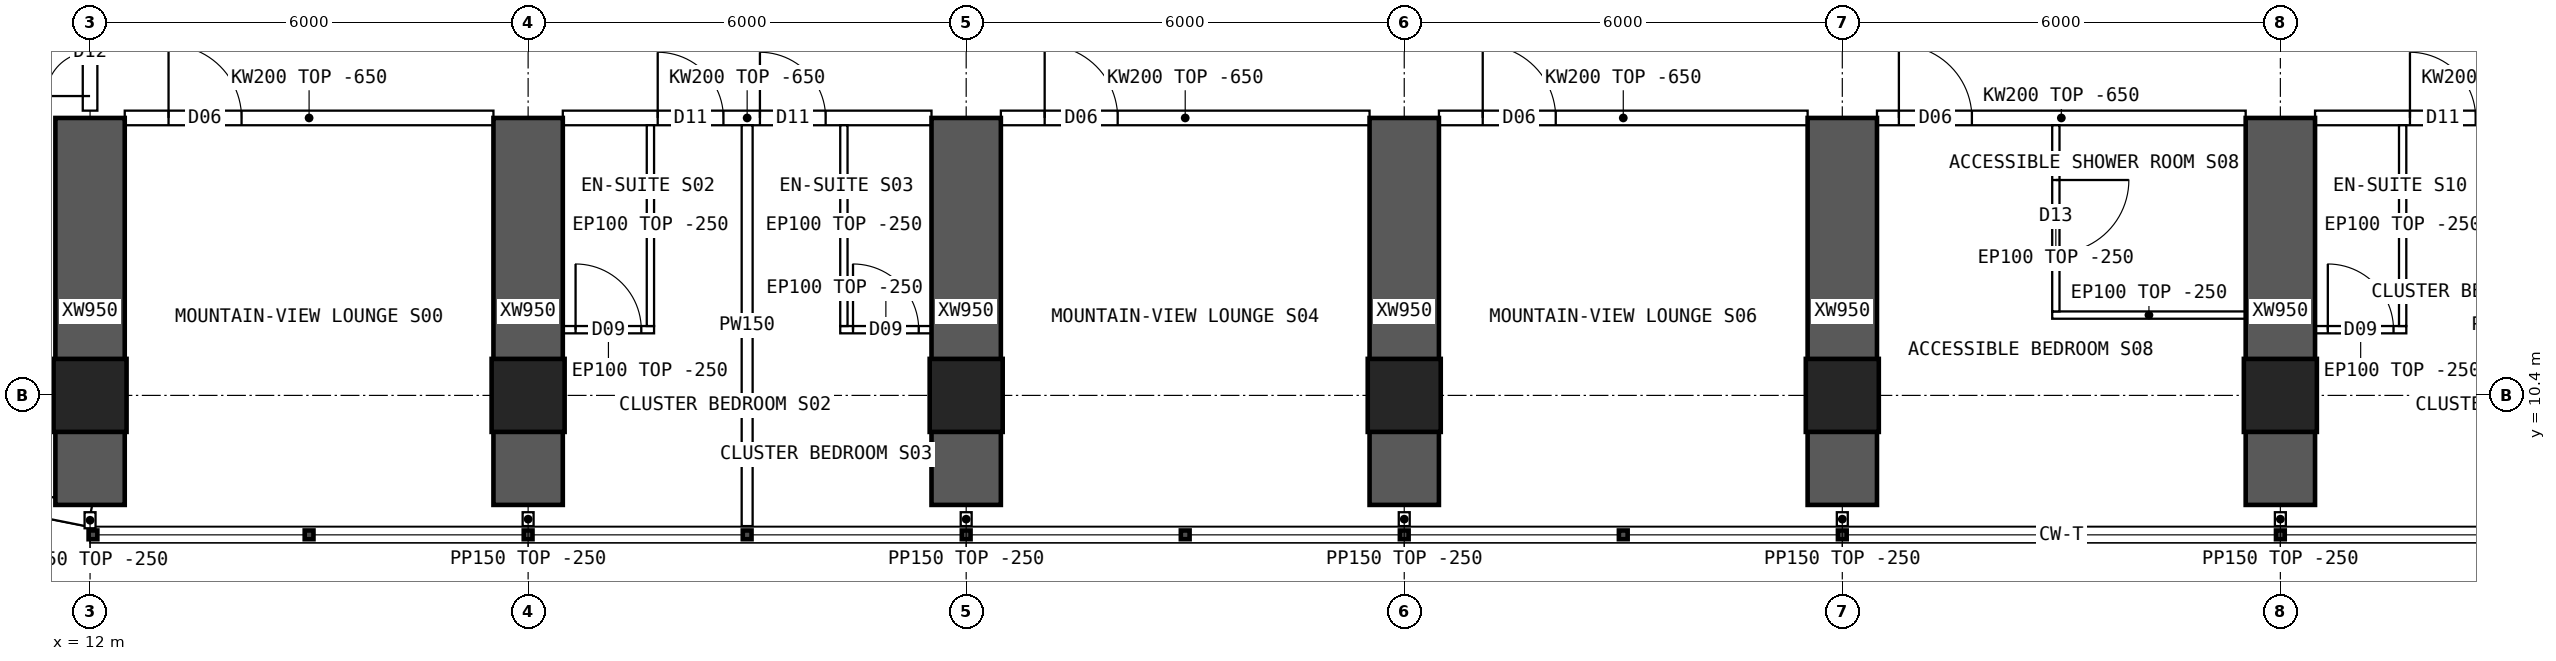
"""IFC4 building model, lengths in metres.
Left out: names, types, materials, properties, quantities, classifications, styles, units other than length and angle.
Written with IfcOpenShell. Run it as: python <this file> out.ifc"""

import sys

from ifc_helpers import new_model, si_unit, direction, frame, frame_2d, origin, origin_2d, place, context, subcontext, project, spatial, polyline, rectangle, hollow_rectangle, outline, extrude, element, fill, save


model = new_model("IFC4")
c1 = context("Model", 3, precision=1e-05, world=origin(), true_north=direction((0.0, 1.0)))
c2 = subcontext(c1, "Body", "Model", "MODEL_VIEW")
j1 = project(units=[si_unit("LENGTHUNIT", "METRE"), si_unit("PLANEANGLEUNIT", "RADIAN")], contexts=[c1])
p1 = place(None, origin())
s1 = spatial("IfcSite", under=j1, at=p1, CompositionType="ELEMENT")
p2 = place(p1, origin())
s2 = spatial("IfcBuilding", under=s1, at=p2, CompositionType="ELEMENT")
p3 = place(p2, frame((0.0, 0.0, 103.15)))
s3 = spatial("IfcBuildingStorey", under=s2, at=p3, CompositionType="ELEMENT", Elevation=103.15)
for number, where, z_axis, x_axis in (
    (1, (12.0, 10.4, 0.0), (0.0, 0.0, 1.0), (1.0, 0.0, 0.0)),
    (2, (18.0, 10.4, 0.0), (0.0, 0.0, 1.0), (1.0, 0.0, 0.0)),
    (3, (24.0, 10.4, 0.0), (0.0, 0.0, 1.0), (1.0, 0.0, 0.0)),
    (4, (30.0, 10.4, 0.0), (0.0, 0.0, 1.0), (1.0, 0.0, 0.0)),
    (5, (36.0, 10.4, 0.0), (0.0, 0.0, 1.0), (1.0, 0.0, 0.0)),
    (6, (42.0, 10.4, 0.0), (0.0, 0.0, 1.0), (1.0, 0.0, 0.0)),
):
    element("IfcColumn", number, at=place(p3, frame(where, z_axis=z_axis, x_axis=x_axis)), inside=s3, PredefinedType="COLUMN", context=c2, shape_type="SweptSolid", body=[
        extrude(hollow_rectangle(XDim=1.0, YDim=1.0, WallThickness=0.1, at=origin_2d()), origin(), (0.0, 0.0, 1.0), 3.75),
    ])
for number, where, z_axis, x_axis in (
    (7, (12.0, 8.9, 0.0), (0.0, 0.0, 1.0), (0.0, 1.0, 0.0)),
    (8, (18.0, 8.9, 0.0), (0.0, 0.0, 1.0), (0.0, 1.0, 0.0)),
    (9, (24.0, 8.9, 0.0), (0.0, 0.0, 1.0), (0.0, 1.0, 0.0)),
    (10, (30.0, 8.9, 0.0), (0.0, 0.0, 1.0), (0.0, 1.0, 0.0)),
    (11, (36.0, 8.9, 0.0), (0.0, 0.0, 1.0), (0.0, 1.0, 0.0)),
    (12, (42.0, 8.9, 0.0), (0.0, 0.0, 1.0), (0.0, 1.0, 0.0)),
):
    element("IfcWall", number, at=place(p3, frame(where, z_axis=z_axis, x_axis=x_axis)), inside=s3, PredefinedType="SHEAR", context=c2, shape_type="SweptSolid", body=[
        extrude(rectangle(XDim=5.3, YDim=0.95, at=frame_2d((2.65, 0.0))), origin(), (0.0, 0.0, 1.0), 3.75),
    ])
p4 = place(p3, frame((8.843, 9.378, 0.0), z_axis=(0.0, 0.0, 1.0), x_axis=(0.980787251524, -0.195080412259, 0.0)))
e13 = element("IfcWall", 13, at=p4, inside=s3, PredefinedType="SOLIDWALL", context=c2, shape_type="SweptSolid", body=[
    extrude(outline(polyline([(-0.03, -0.15), (3.249, -0.15), (3.189, 0.15), (0.03, 0.15), (-0.03, -0.15)])), origin(), (0.0, 0.0, 1.0), 3.5),
])
p5 = place(p4, frame((0.909, 0.0, 0.9)))
e14 = element("IfcOpeningElement", 14, at=p5, cuts=e13, PredefinedType="OPENING", context=c2, shape_type="SweptSolid", body=[
    extrude(rectangle(XDim=1.4, YDim=1.8, at=frame_2d((0.7, 0.9))), frame((0.0, 0.16, 0.0), z_axis=(0.0, -1.0, 0.0), x_axis=(1.0, 0.0, 0.0)), (0.0, 0.0, 1.0), 0.32),
])
p6 = place(p3, frame((12.475, 14.2, 0.0), z_axis=(0.0, 0.0, 1.0), x_axis=(1.0, 0.0, 0.0)))
e15 = element("IfcWall", 15, at=p6, inside=s3, PredefinedType="SOLIDWALL", context=c2, shape_type="SweptSolid", body=[
    extrude(outline(polyline([(0.0, 0.0), (5.05, 0.0), (5.05, 3.1), (0.0, 3.1), (0.0, 0.0)])), frame((0.0, 0.1, 0.0), z_axis=(0.0, -1.0, 0.0), x_axis=(1.0, 0.0, 0.0)), (0.0, 0.0, 1.0), 0.2),
])
p7 = place(p6, frame((0.6, 0.0, 0.0)))
e16 = element("IfcOpeningElement", 16, at=p7, cuts=e15, PredefinedType="OPENING", context=c2, shape_type="SweptSolid", body=[
    extrude(rectangle(XDim=1.0, YDim=2.1, at=frame_2d((0.5, 1.05))), frame((0.0, 0.11, 0.0), z_axis=(0.0, -1.0, 0.0), x_axis=(1.0, 0.0, 0.0)), (0.0, 0.0, 1.0), 0.22),
])
p8 = place(p3, frame((18.475, 14.2, 0.0), z_axis=(0.0, 0.0, 1.0), x_axis=(1.0, 0.0, 0.0)))
e17 = element("IfcWall", 17, at=p8, inside=s3, PredefinedType="SOLIDWALL", context=c2, shape_type="SweptSolid", body=[
    extrude(outline(polyline([(0.0, 0.0), (5.05, 0.0), (5.05, 3.1), (0.0, 3.1), (0.0, 0.0)])), frame((0.0, 0.1, 0.0), z_axis=(0.0, -1.0, 0.0), x_axis=(1.0, 0.0, 0.0)), (0.0, 0.0, 1.0), 0.2),
])
p9 = place(p8, frame((1.3, 0.0, 0.0)))
e18 = element("IfcOpeningElement", 18, at=p9, cuts=e17, PredefinedType="OPENING", context=c2, shape_type="SweptSolid", body=[
    extrude(rectangle(XDim=0.9, YDim=2.1, at=frame_2d((0.45, 1.05))), frame((0.0, 0.11, 0.0), z_axis=(0.0, -1.0, 0.0), x_axis=(1.0, 0.0, 0.0)), (0.0, 0.0, 1.0), 0.22),
])
p10 = place(p8, frame((2.7, 0.0, 0.0)))
e19 = element("IfcOpeningElement", 19, at=p10, cuts=e17, PredefinedType="OPENING", context=c2, shape_type="SweptSolid", body=[
    extrude(rectangle(XDim=0.9, YDim=2.1, at=frame_2d((0.45, 1.05))), frame((0.0, 0.11, 0.0), z_axis=(0.0, -1.0, 0.0), x_axis=(1.0, 0.0, 0.0)), (0.0, 0.0, 1.0), 0.22),
])
p11 = place(p3, frame((24.475, 14.2, 0.0), z_axis=(0.0, 0.0, 1.0), x_axis=(1.0, 0.0, 0.0)))
e20 = element("IfcWall", 20, at=p11, inside=s3, PredefinedType="SOLIDWALL", context=c2, shape_type="SweptSolid", body=[
    extrude(outline(polyline([(0.0, 0.0), (5.05, 0.0), (5.05, 3.1), (0.0, 3.1), (0.0, 0.0)])), frame((0.0, 0.1, 0.0), z_axis=(0.0, -1.0, 0.0), x_axis=(1.0, 0.0, 0.0)), (0.0, 0.0, 1.0), 0.2),
])
p12 = place(p11, frame((0.6, 0.0, 0.0)))
e21 = element("IfcOpeningElement", 21, at=p12, cuts=e20, PredefinedType="OPENING", context=c2, shape_type="SweptSolid", body=[
    extrude(rectangle(XDim=1.0, YDim=2.1, at=frame_2d((0.5, 1.05))), frame((0.0, 0.11, 0.0), z_axis=(0.0, -1.0, 0.0), x_axis=(1.0, 0.0, 0.0)), (0.0, 0.0, 1.0), 0.22),
])
p13 = place(p3, frame((30.475, 14.2, 0.0), z_axis=(0.0, 0.0, 1.0), x_axis=(1.0, 0.0, 0.0)))
e22 = element("IfcWall", 22, at=p13, inside=s3, PredefinedType="SOLIDWALL", context=c2, shape_type="SweptSolid", body=[
    extrude(outline(polyline([(0.0, 0.0), (5.05, 0.0), (5.05, 3.1), (0.0, 3.1), (0.0, 0.0)])), frame((0.0, 0.1, 0.0), z_axis=(0.0, -1.0, 0.0), x_axis=(1.0, 0.0, 0.0)), (0.0, 0.0, 1.0), 0.2),
])
p14 = place(p13, frame((0.6, 0.0, 0.0)))
e23 = element("IfcOpeningElement", 23, at=p14, cuts=e22, PredefinedType="OPENING", context=c2, shape_type="SweptSolid", body=[
    extrude(rectangle(XDim=1.0, YDim=2.1, at=frame_2d((0.5, 1.05))), frame((0.0, 0.11, 0.0), z_axis=(0.0, -1.0, 0.0), x_axis=(1.0, 0.0, 0.0)), (0.0, 0.0, 1.0), 0.22),
])
p15 = place(p3, frame((36.475, 14.2, 0.0), z_axis=(0.0, 0.0, 1.0), x_axis=(1.0, 0.0, 0.0)))
e24 = element("IfcWall", 24, at=p15, inside=s3, PredefinedType="SOLIDWALL", context=c2, shape_type="SweptSolid", body=[
    extrude(outline(polyline([(0.0, 0.0), (5.05, 0.0), (5.05, 3.1), (0.0, 3.1), (0.0, 0.0)])), frame((0.0, 0.1, 0.0), z_axis=(0.0, -1.0, 0.0), x_axis=(1.0, 0.0, 0.0)), (0.0, 0.0, 1.0), 0.2),
])
p16 = place(p15, frame((0.3, 0.0, 0.0)))
e25 = element("IfcOpeningElement", 25, at=p16, cuts=e24, PredefinedType="OPENING", context=c2, shape_type="SweptSolid", body=[
    extrude(rectangle(XDim=1.0, YDim=2.1, at=frame_2d((0.5, 1.05))), frame((0.0, 0.11, 0.0), z_axis=(0.0, -1.0, 0.0), x_axis=(1.0, 0.0, 0.0)), (0.0, 0.0, 1.0), 0.22),
])
p17 = place(p3, frame((42.475, 14.2, 0.0), z_axis=(0.0, 0.0, 1.0), x_axis=(1.0, 0.0, 0.0)))
e26 = element("IfcWall", 26, at=p17, inside=s3, PredefinedType="SOLIDWALL", context=c2, shape_type="SweptSolid", body=[
    extrude(outline(polyline([(0.0, 0.0), (5.05, 0.0), (5.05, 3.1), (0.0, 3.1), (0.0, 0.0)])), frame((0.0, 0.1, 0.0), z_axis=(0.0, -1.0, 0.0), x_axis=(1.0, 0.0, 0.0)), (0.0, 0.0, 1.0), 0.2),
])
p18 = place(p17, frame((1.3, 0.0, 0.0)))
e27 = element("IfcOpeningElement", 27, at=p18, cuts=e26, PredefinedType="OPENING", context=c2, shape_type="SweptSolid", body=[
    extrude(rectangle(XDim=0.9, YDim=2.1, at=frame_2d((0.45, 1.05))), frame((0.0, 0.11, 0.0), z_axis=(0.0, -1.0, 0.0), x_axis=(1.0, 0.0, 0.0)), (0.0, 0.0, 1.0), 0.22),
])
p19 = place(p17, frame((2.7, 0.0, 0.0)))
e28 = element("IfcOpeningElement", 28, at=p19, cuts=e26, PredefinedType="OPENING", context=c2, shape_type="SweptSolid", body=[
    extrude(rectangle(XDim=0.9, YDim=2.1, at=frame_2d((0.45, 1.05))), frame((0.0, 0.11, 0.0), z_axis=(0.0, -1.0, 0.0), x_axis=(1.0, 0.0, 0.0)), (0.0, 0.0, 1.0), 0.22),
])
p20 = place(p3, frame((21.0, 8.61, 0.0), z_axis=(0.0, 0.0, 1.0), x_axis=(0.0, 1.0, 0.0)))
e29 = element("IfcWall", 29, at=p20, inside=s3, PredefinedType="PARTITIONING", context=c2, shape_type="SweptSolid", body=[
    extrude(outline(polyline([(0.0, 0.0), (5.49, 0.0), (5.49, 3.1), (5.442, 3.1), (5.44, 3.5), (1.992, 3.5), (1.99, 3.1), (1.592, 3.1), (1.59, 3.5), (0.0, 3.5), (0.0, 0.0)])), frame((0.0, 0.075, 0.0), z_axis=(0.0, -1.0, 0.0), x_axis=(1.0, 0.0, 0.0)), (0.0, 0.0, 1.0), 0.15),
])
p21 = place(p3, frame((19.725, 11.3, 0.0), z_axis=(0.0, 0.0, 1.0), x_axis=(-1.0, 0.0, 0.0)))
e30 = element("IfcWall", 30, at=p21, inside=s3, PredefinedType="PARTITIONING", context=c2, shape_type="SweptSolid", body=[
    extrude(rectangle(XDim=1.25, YDim=0.1, at=frame_2d((0.625, 0.0))), origin(), (0.0, 0.0, 1.0), 3.5),
])
p22 = place(p21, frame((0.175, 0.0, 0.0)))
e31 = element("IfcOpeningElement", 31, at=p22, cuts=e30, PredefinedType="OPENING", context=c2, shape_type="SweptSolid", body=[
    extrude(rectangle(XDim=0.9, YDim=2.1, at=frame_2d((0.45, 1.05))), frame((0.0, 0.06, 0.0), z_axis=(0.0, -1.0, 0.0), x_axis=(1.0, 0.0, 0.0)), (0.0, 0.0, 1.0), 0.12),
])
p23 = place(p3, frame((19.675, 11.35, 0.0), z_axis=(0.0, 0.0, 1.0), x_axis=(0.0, 1.0, 0.0)))
e32 = element("IfcWall", 32, at=p23, inside=s3, PredefinedType="PARTITIONING", context=c2, shape_type="SweptSolid", body=[
    extrude(outline(polyline([(0.0, 0.0), (2.75, 0.0), (2.75, 3.1), (2.702, 3.1), (2.7, 3.5), (0.0, 3.5), (0.0, 0.0)])), frame((0.0, 0.05, 0.0), z_axis=(0.0, -1.0, 0.0), x_axis=(1.0, 0.0, 0.0)), (0.0, 0.0, 1.0), 0.1),
])
p24 = place(p3, frame((23.525, 11.3, 0.0), z_axis=(0.0, 0.0, 1.0), x_axis=(-1.0, 0.0, 0.0)))
e33 = element("IfcWall", 33, at=p24, inside=s3, PredefinedType="PARTITIONING", context=c2, shape_type="SweptSolid", body=[
    extrude(rectangle(XDim=1.25, YDim=0.1, at=frame_2d((0.625, 0.0))), origin(), (0.0, 0.0, 1.0), 3.5),
])
p25 = place(p24, frame((0.175, 0.0, 0.0)))
e34 = element("IfcOpeningElement", 34, at=p25, cuts=e33, PredefinedType="OPENING", context=c2, shape_type="SweptSolid", body=[
    extrude(rectangle(XDim=0.9, YDim=2.1, at=frame_2d((0.45, 1.05))), frame((0.0, 0.06, 0.0), z_axis=(0.0, -1.0, 0.0), x_axis=(1.0, 0.0, 0.0)), (0.0, 0.0, 1.0), 0.12),
])
p26 = place(p3, frame((22.325, 11.35, 0.0), z_axis=(0.0, 0.0, 1.0), x_axis=(0.0, 1.0, 0.0)))
e35 = element("IfcWall", 35, at=p26, inside=s3, PredefinedType="PARTITIONING", context=c2, shape_type="SweptSolid", body=[
    extrude(outline(polyline([(0.0, 0.0), (2.75, 0.0), (2.75, 3.1), (2.702, 3.1), (2.7, 3.5), (0.0, 3.5), (0.0, 0.0)])), frame((0.0, 0.05, 0.0), z_axis=(0.0, -1.0, 0.0), x_axis=(1.0, 0.0, 0.0)), (0.0, 0.0, 1.0), 0.1),
])
p27 = place(p3, frame((38.875, 11.5, 0.0), z_axis=(0.0, 0.0, 1.0), x_axis=(1.0, 0.0, 0.0)))
e36 = element("IfcWall", 36, at=p27, inside=s3, PredefinedType="PARTITIONING", context=c2, shape_type="SweptSolid", body=[
    extrude(rectangle(XDim=2.65, YDim=0.1, at=frame_2d((1.325, 0.0))), origin(), (0.0, 0.0, 1.0), 3.5),
])
p28 = place(p3, frame((38.925, 11.55, 0.0), z_axis=(0.0, 0.0, 1.0), x_axis=(0.0, 1.0, 0.0)))
e37 = element("IfcWall", 37, at=p28, inside=s3, PredefinedType="PARTITIONING", context=c2, shape_type="SweptSolid", body=[
    extrude(outline(polyline([(0.0, 0.0), (2.55, 0.0), (2.55, 3.1), (2.502, 3.1), (2.5, 3.5), (0.0, 3.5), (0.0, 0.0)])), frame((0.0, 0.05, 0.0), z_axis=(0.0, -1.0, 0.0), x_axis=(1.0, 0.0, 0.0)), (0.0, 0.0, 1.0), 0.1),
])
p29 = place(p28, frame((0.8, 0.0, 0.0)))
e38 = element("IfcOpeningElement", 38, at=p29, cuts=e37, PredefinedType="OPENING", context=c2, shape_type="SweptSolid", body=[
    extrude(rectangle(XDim=1.0, YDim=2.1, at=frame_2d((0.5, 1.05))), frame((0.0, 0.06, 0.0), z_axis=(0.0, -1.0, 0.0), x_axis=(1.0, 0.0, 0.0)), (0.0, 0.0, 1.0), 0.12),
])
p30 = place(p3, frame((43.725, 11.3, 0.0), z_axis=(0.0, 0.0, 1.0), x_axis=(-1.0, 0.0, 0.0)))
e39 = element("IfcWall", 39, at=p30, inside=s3, PredefinedType="PARTITIONING", context=c2, shape_type="SweptSolid", body=[
    extrude(rectangle(XDim=1.25, YDim=0.1, at=frame_2d((0.625, 0.0))), origin(), (0.0, 0.0, 1.0), 3.5),
])
p31 = place(p30, frame((0.175, 0.0, 0.0)))
e40 = element("IfcOpeningElement", 40, at=p31, cuts=e39, PredefinedType="OPENING", context=c2, shape_type="SweptSolid", body=[
    extrude(rectangle(XDim=0.9, YDim=2.1, at=frame_2d((0.45, 1.05))), frame((0.0, 0.06, 0.0), z_axis=(0.0, -1.0, 0.0), x_axis=(1.0, 0.0, 0.0)), (0.0, 0.0, 1.0), 0.12),
])
p32 = place(p3, frame((43.675, 11.35, 0.0), z_axis=(0.0, 0.0, 1.0), x_axis=(0.0, 1.0, 0.0)))
e41 = element("IfcWall", 41, at=p32, inside=s3, PredefinedType="PARTITIONING", context=c2, shape_type="SweptSolid", body=[
    extrude(outline(polyline([(0.0, 0.0), (2.75, 0.0), (2.75, 3.1), (2.702, 3.1), (2.7, 3.5), (0.0, 3.5), (0.0, 0.0)])), frame((0.0, 0.05, 0.0), z_axis=(0.0, -1.0, 0.0), x_axis=(1.0, 0.0, 0.0)), (0.0, 0.0, 1.0), 0.1),
])
p33 = place(p3, frame((12.0, 14.3, 0.0), z_axis=(0.0, 0.0, 1.0), x_axis=(0.0, 1.0, 0.0)))
e42 = element("IfcWall", 42, at=p33, inside=s3, PredefinedType="SOLIDWALL", context=c2, shape_type="SweptSolid", body=[
    extrude(outline(polyline([(0.0, 0.0), (1.6, 0.0), (1.6, 3.1), (0.0, 3.1), (0.0, 0.0)])), frame((0.0, 0.1, 0.0), z_axis=(0.0, -1.0, 0.0), x_axis=(1.0, 0.0, 0.0)), (0.0, 0.0, 1.0), 0.2),
])
p34 = place(p33, frame((0.2, 0.0, 0.0)))
e43 = element("IfcOpeningElement", 43, at=p34, cuts=e42, PredefinedType="OPENING", context=c2, shape_type="SweptSolid", body=[
    extrude(rectangle(XDim=1.2, YDim=2.1, at=frame_2d((0.6, 1.05))), frame((0.0, 0.11, 0.0), z_axis=(0.0, -1.0, 0.0), x_axis=(1.0, 0.0, 0.0)), (0.0, 0.0, 1.0), 0.22),
])
p35 = place(p3, frame((12.0, 8.8, 0.0), z_axis=(0.0, 0.0, 1.0), x_axis=(0.0, -1.0, 0.0)))
e44 = element("IfcWall", 44, at=p35, inside=s3, PredefinedType="PARTITIONING", context=c2, shape_type="SweptSolid", body=[
    extrude(rectangle(XDim=0.22, YDim=0.15, at=frame_2d((0.11, 0.0))), origin(), (0.0, 0.0, 1.0), 3.5),
])
for number, where, z_axis, x_axis in (
    (45, (18.0, 8.8, 0.0), (0.0, 0.0, 1.0), (0.0, -1.0, 0.0)),
    (46, (24.0, 8.8, 0.0), (0.0, 0.0, 1.0), (0.0, -1.0, 0.0)),
    (47, (30.0, 8.8, 0.0), (0.0, 0.0, 1.0), (0.0, -1.0, 0.0)),
    (48, (36.0, 8.8, 0.0), (0.0, 0.0, 1.0), (0.0, -1.0, 0.0)),
    (49, (42.0, 8.8, 0.0), (0.0, 0.0, 1.0), (0.0, -1.0, 0.0)),
):
    element("IfcWall", number, at=place(p3, frame(where, z_axis=z_axis, x_axis=x_axis)), inside=s3, PredefinedType="PARTITIONING", context=c2, shape_type="SweptSolid", body=[
        extrude(rectangle(XDim=0.19, YDim=0.15, at=frame_2d((0.095, 0.0))), origin(), (0.0, 0.0, 1.0), 3.5),
    ])
p36 = place(p7, origin())
e50 = element("IfcDoor", 50, at=p36, inside=s3, OperationType="SINGLE_SWING_LEFT", PredefinedType="DOOR", context=c2, shape_type="SweptSolid", body=[
    extrude(rectangle(XDim=1.0, YDim=2.1, at=frame_2d((0.5, 1.05))), frame((0.0, 0.025, 0.0), z_axis=(0.0, -1.0, 0.0), x_axis=(1.0, 0.0, 0.0)), (0.0, 0.0, 1.0), 0.05),
])
fill(e16, e50)
p37 = place(p22, origin())
e51 = element("IfcDoor", 51, at=p37, inside=s3, OperationType="SINGLE_SWING_RIGHT", PredefinedType="DOOR", context=c2, shape_type="SweptSolid", body=[
    extrude(rectangle(XDim=0.9, YDim=2.1, at=frame_2d((0.45, 1.05))), frame((0.0, 0.025, 0.0), z_axis=(0.0, -1.0, 0.0), x_axis=(1.0, 0.0, 0.0)), (0.0, 0.0, 1.0), 0.05),
])
fill(e31, e51)
p38 = place(p9, origin())
e52 = element("IfcDoor", 52, at=p38, inside=s3, OperationType="SINGLE_SWING_LEFT", PredefinedType="DOOR", context=c2, shape_type="SweptSolid", body=[
    extrude(rectangle(XDim=0.9, YDim=2.1, at=frame_2d((0.45, 1.05))), frame((0.0, 0.025, 0.0), z_axis=(0.0, -1.0, 0.0), x_axis=(1.0, 0.0, 0.0)), (0.0, 0.0, 1.0), 0.05),
])
fill(e18, e52)
p39 = place(p25, origin())
e53 = element("IfcDoor", 53, at=p39, inside=s3, OperationType="SINGLE_SWING_RIGHT", PredefinedType="DOOR", context=c2, shape_type="SweptSolid", body=[
    extrude(rectangle(XDim=0.9, YDim=2.1, at=frame_2d((0.45, 1.05))), frame((0.0, 0.025, 0.0), z_axis=(0.0, -1.0, 0.0), x_axis=(1.0, 0.0, 0.0)), (0.0, 0.0, 1.0), 0.05),
])
fill(e34, e53)
p40 = place(p10, origin())
e54 = element("IfcDoor", 54, at=p40, inside=s3, OperationType="SINGLE_SWING_LEFT", PredefinedType="DOOR", context=c2, shape_type="SweptSolid", body=[
    extrude(rectangle(XDim=0.9, YDim=2.1, at=frame_2d((0.45, 1.05))), frame((0.0, 0.025, 0.0), z_axis=(0.0, -1.0, 0.0), x_axis=(1.0, 0.0, 0.0)), (0.0, 0.0, 1.0), 0.05),
])
fill(e19, e54)
p41 = place(p12, origin())
e55 = element("IfcDoor", 55, at=p41, inside=s3, OperationType="SINGLE_SWING_LEFT", PredefinedType="DOOR", context=c2, shape_type="SweptSolid", body=[
    extrude(rectangle(XDim=1.0, YDim=2.1, at=frame_2d((0.5, 1.05))), frame((0.0, 0.025, 0.0), z_axis=(0.0, -1.0, 0.0), x_axis=(1.0, 0.0, 0.0)), (0.0, 0.0, 1.0), 0.05),
])
fill(e21, e55)
p42 = place(p14, origin())
e56 = element("IfcDoor", 56, at=p42, inside=s3, OperationType="SINGLE_SWING_LEFT", PredefinedType="DOOR", context=c2, shape_type="SweptSolid", body=[
    extrude(rectangle(XDim=1.0, YDim=2.1, at=frame_2d((0.5, 1.05))), frame((0.0, 0.025, 0.0), z_axis=(0.0, -1.0, 0.0), x_axis=(1.0, 0.0, 0.0)), (0.0, 0.0, 1.0), 0.05),
])
fill(e23, e56)
p43 = place(p29, origin())
e57 = element("IfcDoor", 57, at=p43, inside=s3, OperationType="SINGLE_SWING_RIGHT", PredefinedType="DOOR", context=c2, shape_type="SweptSolid", body=[
    extrude(rectangle(XDim=1.0, YDim=2.1, at=frame_2d((0.5, 1.05))), frame((0.0, 0.025, 0.0), z_axis=(0.0, -1.0, 0.0), x_axis=(1.0, 0.0, 0.0)), (0.0, 0.0, 1.0), 0.05),
])
fill(e38, e57)
p44 = place(p16, origin())
e58 = element("IfcDoor", 58, at=p44, inside=s3, OperationType="SINGLE_SWING_LEFT", PredefinedType="DOOR", context=c2, shape_type="SweptSolid", body=[
    extrude(rectangle(XDim=1.0, YDim=2.1, at=frame_2d((0.5, 1.05))), frame((0.0, 0.025, 0.0), z_axis=(0.0, -1.0, 0.0), x_axis=(1.0, 0.0, 0.0)), (0.0, 0.0, 1.0), 0.05),
])
fill(e25, e58)
p45 = place(p31, origin())
e59 = element("IfcDoor", 59, at=p45, inside=s3, OperationType="SINGLE_SWING_RIGHT", PredefinedType="DOOR", context=c2, shape_type="SweptSolid", body=[
    extrude(rectangle(XDim=0.9, YDim=2.1, at=frame_2d((0.45, 1.05))), frame((0.0, 0.025, 0.0), z_axis=(0.0, -1.0, 0.0), x_axis=(1.0, 0.0, 0.0)), (0.0, 0.0, 1.0), 0.05),
])
fill(e40, e59)
p46 = place(p18, origin())
e60 = element("IfcDoor", 60, at=p46, inside=s3, OperationType="SINGLE_SWING_LEFT", PredefinedType="DOOR", context=c2, shape_type="SweptSolid", body=[
    extrude(rectangle(XDim=0.9, YDim=2.1, at=frame_2d((0.45, 1.05))), frame((0.0, 0.025, 0.0), z_axis=(0.0, -1.0, 0.0), x_axis=(1.0, 0.0, 0.0)), (0.0, 0.0, 1.0), 0.05),
])
fill(e27, e60)
p47 = place(p34, origin())
e61 = element("IfcDoor", 61, at=p47, inside=s3, OperationType="DOUBLE_DOOR_SINGLE_SWING", PredefinedType="DOOR", context=c2, shape_type="SweptSolid", body=[
    extrude(rectangle(XDim=1.2, YDim=2.1, at=frame_2d((0.6, 1.05))), frame((0.0, 0.025, 0.0), z_axis=(0.0, -1.0, 0.0), x_axis=(1.0, 0.0, 0.0)), (0.0, 0.0, 1.0), 0.05),
])
fill(e43, e61)
save(model, sys.argv[1])
